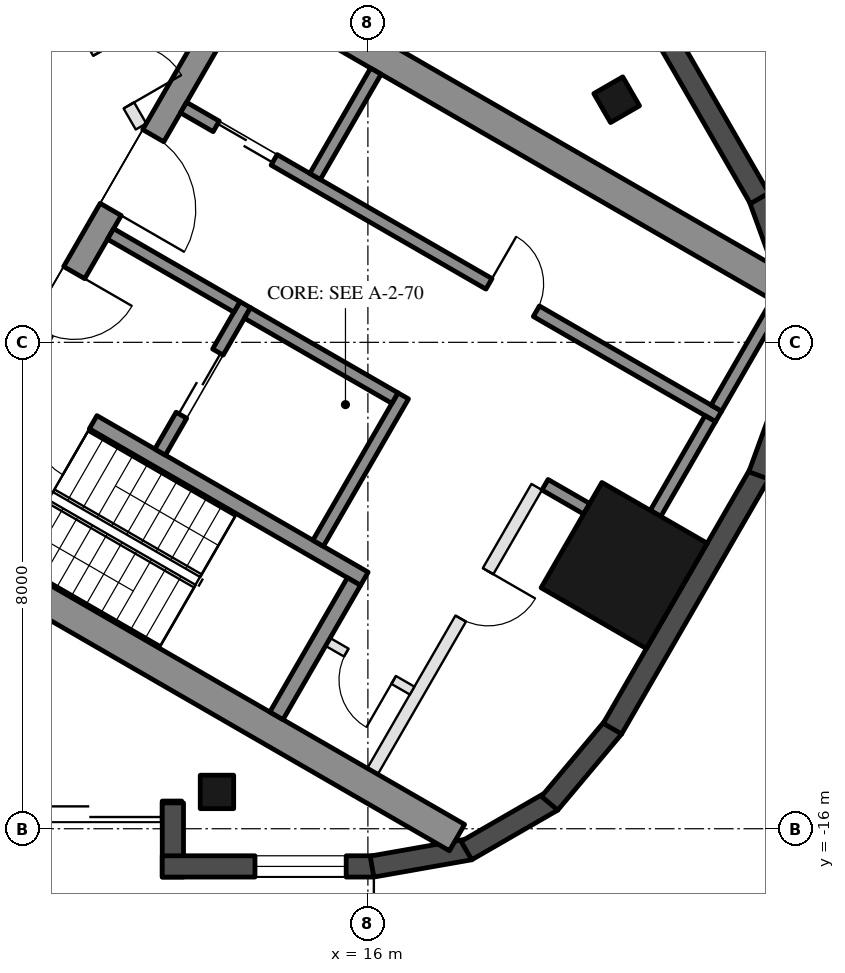
"""IFC4 building model, lengths in metres.
Left out: names, types, materials, properties, quantities, classifications, styles, units other than length and angle.
Written with IfcOpenShell. Run it as: python <this file> out.ifc"""

import sys

from ifc_helpers import new_model, si_unit, direction, frame, frame_2d, origin, origin_2d, place, context, subcontext, project, spatial, rectangle, hollow_rectangle, extrude, boolean, halfspace, element, fill, save


model = new_model("IFC4")
c1 = context("Model", 3, precision=1e-05, world=origin(), true_north=direction((0.0, 1.0)))
c2 = subcontext(c1, "Body", "Model", "MODEL_VIEW")
j1 = project(units=[si_unit("LENGTHUNIT", "METRE"), si_unit("PLANEANGLEUNIT", "RADIAN")], contexts=[c1])
p1 = place(None, origin())
s1 = spatial("IfcSite", under=j1, at=p1, CompositionType="ELEMENT")
p2 = place(p1, origin())
s2 = spatial("IfcBuilding", under=s1, at=p2, CompositionType="ELEMENT")
p3 = place(p2, frame((0.0, 0.0, 302.2)))
s3 = spatial("IfcBuildingStorey", under=s2, at=p3, CompositionType="ELEMENT", Elevation=302.2)
for number, where, z_axis, x_axis in (
    (1, (13.518, -15.395, 0.0), (0.0, 0.0, 1.0), (-1.0, 0.0, 0.0)),
    (2, (20.091, -4.01, 0.0), (0.0, 0.0, 1.0), (-0.5, 0.866, 0.0)),
):
    element("IfcColumn", number, at=place(p3, frame(where, z_axis=z_axis, x_axis=x_axis)), inside=s3, PredefinedType="COLUMN", context=c2, shape_type="SweptSolid", body=[
        boolean("DIFFERENCE", extrude(hollow_rectangle(XDim=0.55, YDim=0.55, WallThickness=0.025, at=origin_2d()), origin(), (0.0, 0.0, 1.0), 3.7), halfspace(frame((0.0, 0.0, 0.04), z_axis=(0.0, 0.0, 1.0), x_axis=(1.0, 0.0, 0.0)), True)),
    ])
p4 = place(p3, frame((20.214, -11.671, 0.0), z_axis=(0.0, 0.0, 1.0), x_axis=(0.5, 0.866025403784, 0.0)))
e3 = element("IfcColumn", 3, at=p4, inside=s3, PredefinedType="COLUMN", context=c2, shape_type="SweptSolid", body=[
    boolean("DIFFERENCE", extrude(hollow_rectangle(XDim=2.0, YDim=2.0, WallThickness=0.05, at=origin_2d()), origin(), (0.0, 0.0, 1.0), 3.7), halfspace(frame((0.0, 0.0, 0.113), z_axis=(0.0, 0.0, 1.0), x_axis=(1.0, 0.0, 0.0)), True)),
])
p5 = place(p3, frame((7.339, -15.719, 0.0), z_axis=(0.0, 0.0, 1.0), x_axis=(1.0, 0.0, 0.0)))
e4 = element("IfcWall", 4, at=p5, inside=s3, PredefinedType="SOLIDWALL", context=c2, shape_type="SweptSolid", body=[
    extrude(rectangle(XDim=5.599, YDim=0.35, at=frame_2d((2.799, 0.0))), origin(), (0.0, 0.0, 1.0), 3.55),
])
p6 = place(p5, frame((2.879, 0.0, 0.0)))
e5 = element("IfcOpeningElement", 5, at=p6, cuts=e4, PredefinedType="OPENING", context=c2, shape_type="SweptSolid", body=[
    extrude(rectangle(XDim=2.4, YDim=2.4, at=frame_2d((1.2, 1.2))), frame((0.0, 0.185, 0.0), z_axis=(0.0, -1.0, 0.0), x_axis=(1.0, 0.0, 0.0)), (0.0, 0.0, 1.0), 0.37),
])
p7 = place(p5, frame((0.831, 0.0, 0.3)))
e6 = element("IfcOpeningElement", 6, at=p7, cuts=e4, PredefinedType="OPENING", context=c2, shape_type="SweptSolid", body=[
    extrude(rectangle(XDim=1.7, YDim=2.65, at=frame_2d((0.85, 1.325))), frame((0.0, 0.185, 0.0), z_axis=(0.0, -1.0, 0.0), x_axis=(1.0, 0.0, 0.0)), (0.0, 0.0, 1.0), 0.37),
])
p8 = place(p3, frame((12.793, -15.575, 0.0), z_axis=(0.0, 0.0, 1.0), x_axis=(0.0, -1.0, 0.0)))
e7 = element("IfcWall", 7, at=p8, inside=s3, PredefinedType="SOLIDWALL", context=c2, shape_type="SweptSolid", body=[
    extrude(rectangle(XDim=1.22, YDim=0.35, at=frame_2d((0.61, 0.0))), origin(), (0.0, 0.0, 1.0), 3.55),
])
p9 = place(p3, frame((12.618, -16.62, 0.0), z_axis=(0.0, 0.0, 1.0), x_axis=(1.0, 0.0, 0.0)))
e8 = element("IfcWall", 8, at=p9, inside=s3, PredefinedType="SOLIDWALL", context=c2, shape_type="SweptSolid", body=[
    extrude(rectangle(XDim=3.48, YDim=0.35, at=frame_2d((1.74, 0.0))), origin(), (0.0, 0.0, 1.0), 3.55),
])
p10 = place(p9, frame((1.525, 0.0, 0.3)))
e9 = element("IfcOpeningElement", 9, at=p10, cuts=e8, PredefinedType="OPENING", context=c2, shape_type="SweptSolid", body=[
    extrude(rectangle(XDim=1.5, YDim=2.65, at=frame_2d((0.75, 1.325))), frame((0.0, 0.185, 0.0), z_axis=(0.0, -1.0, 0.0), x_axis=(1.0, 0.0, 0.0)), (0.0, 0.0, 1.0), 0.37),
])
p11 = place(p3, frame((16.068, -16.622, 0.0), z_axis=(0.0, 0.0, 1.0), x_axis=(0.98479107762, 0.173742721977, 0.0)))
e10 = element("IfcWall", 10, at=p11, inside=s3, PredefinedType="SOLIDWALL", context=c2, shape_type="SweptSolid", body=[
    extrude(rectangle(XDim=1.634, YDim=0.35, at=frame_2d((0.817, 0.0))), origin(), (0.0, 0.0, 1.0), 3.55),
])
p12 = place(p3, frame((17.62, -16.359, 0.0), z_axis=(0.0, 0.0, 1.0), x_axis=(0.866083589932, 0.499899205091, 0.0)))
e11 = element("IfcWall", 11, at=p12, inside=s3, PredefinedType="SOLIDWALL", context=c2, shape_type="SweptSolid", body=[
    extrude(rectangle(XDim=1.634, YDim=0.35, at=frame_2d((0.817, 0.0))), origin(), (0.0, 0.0, 1.0), 3.55),
])
p13 = place(p3, frame((18.989, -15.581, 0.0), z_axis=(0.0, 0.0, 1.0), x_axis=(0.642708448155, 0.766110860562, 0.0)))
e12 = element("IfcWall", 12, at=p13, inside=s3, PredefinedType="SOLIDWALL", context=c2, shape_type="SweptSolid", body=[
    extrude(rectangle(XDim=1.634, YDim=0.35, at=frame_2d((0.817, 0.0))), origin(), (0.0, 0.0, 1.0), 3.55),
])
p14 = place(p3, frame((20.021, -14.354, 0.0), z_axis=(0.0, 0.0, 1.0), x_axis=(0.500012048649, 0.866018447382, 0.0)))
e13 = element("IfcWall", 13, at=p14, inside=s3, PredefinedType="SOLIDWALL", context=c2, shape_type="SweptSolid", body=[
    extrude(rectangle(XDim=4.841, YDim=0.35, at=frame_2d((2.42, 0.0))), origin(), (0.0, 0.0, 1.0), 3.55),
])
for number, where, z_axis, x_axis in (
    (14, (22.429, -10.19, 0.0), (0.0, 0.0, 1.0), (0.342, 0.94, 0.0)),
    (15, (22.988, -7.14, 0.0), (0.0, 0.0, 1.0), (-0.342, 0.94, 0.0)),
):
    element("IfcWall", number, at=place(p3, frame(where, z_axis=z_axis, x_axis=x_axis)), inside=s3, PredefinedType="SOLIDWALL", context=c2, shape_type="SweptSolid", body=[
        extrude(rectangle(XDim=1.634, YDim=0.35, at=frame_2d((0.817, 0.0))), origin(), (0.0, 0.0, 1.0), 3.55),
    ])
p15 = place(p3, frame((22.442, -5.632, 0.0), z_axis=(0.0, 0.0, 1.0), x_axis=(-0.499983205548, 0.866035099848, 0.0)))
e16 = element("IfcWall", 16, at=p15, inside=s3, PredefinedType="SOLIDWALL", context=c2, shape_type="SweptSolid", body=[
    extrude(rectangle(XDim=10.239, YDim=0.35, at=frame_2d((5.12, 0.0))), origin(), (0.0, 0.0, 1.0), 3.55),
])
p16 = place(p15, frame((5.32, 0.0, 0.0)))
e17 = element("IfcOpeningElement", 17, at=p16, cuts=e16, PredefinedType="OPENING", context=c2, shape_type="SweptSolid", body=[
    extrude(rectangle(XDim=2.4, YDim=2.4, at=frame_2d((1.2, 1.2))), frame((0.0, 0.185, 0.0), z_axis=(0.0, -1.0, 0.0), x_axis=(1.0, 0.0, 0.0)), (0.0, 0.0, 1.0), 0.37),
])
p17 = place(p15, frame((3.205, 0.0, 0.3)))
e18 = element("IfcOpeningElement", 18, at=p17, cuts=e16, PredefinedType="OPENING", context=c2, shape_type="SweptSolid", body=[
    extrude(rectangle(XDim=1.8, YDim=2.65, at=frame_2d((0.9, 1.325))), frame((0.0, 0.185, 0.0), z_axis=(0.0, -1.0, 0.0), x_axis=(1.0, 0.0, 0.0)), (0.0, 0.0, 1.0), 0.37),
])
for number, where, z_axis, x_axis in (
    (19, (8.547, -10.997, 0.0), (0.0, 0.0, 1.0), (0.866, -0.5, 0.0)),
    (20, (13.797, -1.903, 0.0), (0.0, 0.0, 1.0), (0.866, -0.5, 0.0)),
):
    element("IfcWall", number, at=place(p3, frame(where, z_axis=z_axis, x_axis=x_axis)), inside=s3, PredefinedType="SHEAR", context=c2, shape_type="SweptSolid", body=[
        extrude(rectangle(XDim=10.298, YDim=0.5, at=frame_2d((5.149, 0.0))), origin(), (0.0, 0.0, 1.0), 3.5),
    ])
p18 = place(p3, frame((8.845, -10.88, 0.0), z_axis=(0.0, 0.0, 1.0), x_axis=(0.500004234368, 0.866022959057, 0.0)))
e21 = element("IfcWall", 21, at=p18, inside=s3, PredefinedType="SHEAR", context=c2, shape_type="SweptSolid", body=[
    extrude(rectangle(XDim=10.0, YDim=0.4, at=frame_2d((5.0, 0.0))), origin(), (0.0, 0.0, 1.0), 3.5),
])
p19 = place(p18, frame((3.55, 0.0, 0.0)))
e22 = element("IfcOpeningElement", 22, at=p19, cuts=e21, PredefinedType="OPENING", context=c2, shape_type="SweptSolid", body=[
    extrude(rectangle(XDim=1.1, YDim=2.1, at=frame_2d((0.55, 1.05))), frame((0.0, 0.21, 0.0), z_axis=(0.0, -1.0, 0.0), x_axis=(1.0, 0.0, 0.0)), (0.0, 0.0, 1.0), 0.42),
])
p20 = place(p18, frame((5.85, 0.0, 0.0)))
e23 = element("IfcOpeningElement", 23, at=p20, cuts=e21, PredefinedType="OPENING", context=c2, shape_type="SweptSolid", body=[
    extrude(rectangle(XDim=1.4, YDim=2.1, at=frame_2d((0.7, 1.05))), frame((0.0, 0.21, 0.0), z_axis=(0.0, -1.0, 0.0), x_axis=(1.0, 0.0, 0.0)), (0.0, 0.0, 1.0), 0.42),
])
p21 = place(p3, frame((10.356, -8.664, 0.0), z_axis=(0.0, 0.0, 1.0), x_axis=(0.866028629588, -0.499994412703, 0.0)))
e24 = element("IfcWall", 24, at=p21, inside=s3, PredefinedType="SHEAR", context=c2, shape_type="SweptSolid", body=[
    extrude(rectangle(XDim=6.45, YDim=0.25, at=frame_2d((3.225, 0.0))), origin(), (0.0, 0.0, 1.0), 3.5),
])
p22 = place(p21, frame((0.3, 0.0, 0.0)))
e25 = element("IfcOpeningElement", 25, at=p22, cuts=e24, PredefinedType="OPENING", context=c2, shape_type="SweptSolid", body=[
    extrude(rectangle(XDim=1.0, YDim=2.1, at=frame_2d((0.5, 1.05))), frame((0.0, 0.135, 0.0), z_axis=(0.0, -1.0, 0.0), x_axis=(1.0, 0.0, 0.0)), (0.0, 0.0, 1.0), 0.27),
])
p23 = place(p3, frame((14.496, -14.143, 0.0), z_axis=(0.0, 0.0, 1.0), x_axis=(0.500062241894, 0.865989465428, 0.0)))
e26 = element("IfcWall", 26, at=p23, inside=s3, PredefinedType="SHEAR", context=c2, shape_type="SweptSolid", body=[
    extrude(rectangle(XDim=2.55, YDim=0.25, at=frame_2d((1.275, 0.0))), origin(), (0.0, 0.0, 1.0), 3.5),
])
p24 = place(p3, frame((15.181, -11.305, 0.0), z_axis=(0.0, 0.0, 1.0), x_axis=(0.49994636267, 0.866056369097, 0.0)))
e27 = element("IfcWall", 27, at=p24, inside=s3, PredefinedType="SHEAR", context=c2, shape_type="SweptSolid", body=[
    extrude(rectangle(XDim=2.8, YDim=0.2, at=frame_2d((1.4, 0.0))), origin(), (0.0, 0.0, 1.0), 3.5),
])
p25 = place(p3, frame((12.583, -9.805, 0.0), z_axis=(0.0, 0.0, 1.0), x_axis=(0.49994636267, 0.866056369097, 0.0)))
e28 = element("IfcWall", 28, at=p25, inside=s3, PredefinedType="SHEAR", context=c2, shape_type="SweptSolid", body=[
    extrude(rectangle(XDim=2.8, YDim=0.2, at=frame_2d((1.4, 0.0))), origin(), (0.0, 0.0, 1.0), 3.5),
])
p26 = place(p25, frame((0.7, 0.0, 0.0)))
e29 = element("IfcOpeningElement", 29, at=p26, cuts=e28, PredefinedType="OPENING", context=c2, shape_type="SweptSolid", body=[
    extrude(rectangle(XDim=1.2, YDim=2.1, at=frame_2d((0.6, 1.05))), frame((0.0, 0.11, 0.0), z_axis=(0.0, -1.0, 0.0), x_axis=(1.0, 0.0, 0.0)), (0.0, 0.0, 1.0), 0.22),
])
p27 = place(p3, frame((11.768, -6.217, 0.0), z_axis=(0.0, 0.0, 1.0), x_axis=(0.866050077142, -0.499957262057, 0.0)))
e30 = element("IfcWall", 30, at=p27, inside=s3, PredefinedType="SHEAR", context=c2, shape_type="SweptSolid", body=[
    extrude(rectangle(XDim=2.4, YDim=0.2, at=frame_2d((1.2, 0.0))), origin(), (0.0, 0.0, 1.0), 3.5),
])
p28 = place(p3, frame((14.02, -7.517, 0.0), z_axis=(0.0, 0.0, 1.0), x_axis=(0.866034573852, -0.49998411664, 0.0)))
e31 = element("IfcWall", 31, at=p28, inside=s3, PredefinedType="SHEAR", context=c2, shape_type="SweptSolid", body=[
    extrude(rectangle(XDim=2.8, YDim=0.2, at=frame_2d((1.4, 0.0))), origin(), (0.0, 0.0, 1.0), 3.5),
])
p29 = place(p3, frame((12.968, -4.138, 0.0), z_axis=(0.0, 0.0, 1.0), x_axis=(0.866028328073, -0.49999493495, 0.0)))
e32 = element("IfcWall", 32, at=p29, inside=s3, PredefinedType="SHEAR", context=c2, shape_type="SweptSolid", body=[
    extrude(rectangle(XDim=10.16, YDim=0.2, at=frame_2d((5.08, 0.0))), origin(), (0.0, 0.0, 1.0), 3.5),
])
p30 = place(p29, frame((0.62, 0.0, 0.0)))
e33 = element("IfcOpeningElement", 33, at=p30, cuts=e32, PredefinedType="OPENING", context=c2, shape_type="SweptSolid", body=[
    extrude(rectangle(XDim=1.1, YDim=2.1, at=frame_2d((0.55, 1.05))), frame((0.0, 0.11, 0.0), z_axis=(0.0, -1.0, 0.0), x_axis=(1.0, 0.0, 0.0)), (0.0, 0.0, 1.0), 0.22),
])
p31 = place(p29, frame((5.8, 0.0, 0.0)))
e34 = element("IfcOpeningElement", 34, at=p31, cuts=e32, PredefinedType="OPENING", context=c2, shape_type="SweptSolid", body=[
    extrude(rectangle(XDim=0.9, YDim=2.1, at=frame_2d((0.45, 1.05))), frame((0.0, 0.11, 0.0), z_axis=(0.0, -1.0, 0.0), x_axis=(1.0, 0.0, 0.0)), (0.0, 0.0, 1.0), 0.22),
])
p32 = place(p3, frame((20.73, -10.814, 0.0), z_axis=(0.0, 0.0, 1.0), x_axis=(0.499961193289, 0.866047807691, 0.0)))
e35 = element("IfcWall", 35, at=p32, inside=s3, PredefinedType="SHEAR", context=c2, shape_type="SweptSolid", body=[
    extrude(rectangle(XDim=1.8, YDim=0.2, at=frame_2d((0.9, 0.0))), origin(), (0.0, 0.0, 1.0), 3.5),
])
p33 = place(p3, frame((18.913, -10.342, 0.0), z_axis=(0.0, 0.0, 1.0), x_axis=(0.86597493103, -0.500087411186, 0.0)))
e36 = element("IfcWall", 36, at=p33, inside=s3, PredefinedType="SHEAR", context=c2, shape_type="SweptSolid", body=[
    extrude(rectangle(XDim=0.791, YDim=0.2, at=frame_2d((0.396, 0.0))), origin(), (0.0, 0.0, 1.0), 3.5),
])
for number, where, z_axis, x_axis in (
    (37, (15.131, -5.272, 0.0), (0.0, 0.0, 1.0), (0.5, 0.866, 0.0)),
    (38, (21.73, -9.082, 0.0), (0.0, 0.0, 1.0), (0.5, 0.866, 0.0)),
):
    element("IfcWall", number, at=place(p3, frame(where, z_axis=z_axis, x_axis=x_axis)), inside=s3, PredefinedType="SHEAR", context=c2, shape_type="SweptSolid", body=[
        extrude(rectangle(XDim=2.0, YDim=0.2, at=frame_2d((1.0, 0.0))), origin(), (0.0, 0.0, 1.0), 3.5),
    ])
p34 = place(p3, frame((16.076, -15.055, 0.0), z_axis=(0.0, 0.0, 1.0), x_axis=(0.499995103361, 0.866028230842, 0.0)))
e39 = element("IfcWall", 39, at=p34, inside=s3, PredefinedType="PARTITIONING", context=c2, shape_type="SweptSolid", body=[
    extrude(rectangle(XDim=5.4, YDim=0.2, at=frame_2d((2.7, 0.0))), origin(), (0.0, 0.0, 1.0), 3.5),
])
p35 = place(p34, frame((2.9, 0.0, 0.0)))
e40 = element("IfcOpeningElement", 40, at=p35, cuts=e39, PredefinedType="OPENING", context=c2, shape_type="SweptSolid", body=[
    extrude(rectangle(XDim=0.9, YDim=2.1, at=frame_2d((0.45, 1.05))), frame((0.0, 0.11, 0.0), z_axis=(0.0, -1.0, 0.0), x_axis=(1.0, 0.0, 0.0)), (0.0, 0.0, 1.0), 0.22),
])
p36 = place(p3, frame((15.342, -12.928, 0.0), z_axis=(0.0, 0.0, 1.0), x_axis=(0.865989903783, -0.500061482766, 0.0)))
e41 = element("IfcWall", 41, at=p36, inside=s3, PredefinedType="PARTITIONING", context=c2, shape_type="SweptSolid", body=[
    extrude(rectangle(XDim=1.6, YDim=0.15, at=frame_2d((0.8, 0.0))), origin(), (0.0, 0.0, 1.0), 3.5),
])
p37 = place(p36, frame((0.35, 0.0, 0.0)))
e42 = element("IfcOpeningElement", 42, at=p37, cuts=e41, PredefinedType="OPENING", context=c2, shape_type="SweptSolid", body=[
    extrude(rectangle(XDim=0.9, YDim=2.1, at=frame_2d((0.45, 1.05))), frame((0.0, 0.085, 0.0), z_axis=(0.0, -1.0, 0.0), x_axis=(1.0, 0.0, 0.0)), (0.0, 0.0, 1.0), 0.17),
])
p38 = place(p3, frame((10.365, -1.152, 0.0), z_axis=(0.0, 0.0, 1.0), x_axis=(0.499999897272, -0.866025463095, 0.0)))
e43 = element("IfcWall", 43, at=p38, inside=s3, PredefinedType="PARTITIONING", context=c2, shape_type="SweptSolid", body=[
    extrude(rectangle(XDim=3.809, YDim=0.2, at=frame_2d((1.904, 0.0))), origin(), (0.0, 0.0, 1.0), 3.1),
])
p39 = place(p38, frame((2.409, 0.0, 0.0)))
e44 = element("IfcOpeningElement", 44, at=p39, cuts=e43, PredefinedType="OPENING", context=c2, shape_type="SweptSolid", body=[
    extrude(rectangle(XDim=1.0, YDim=2.1, at=frame_2d((0.5, 1.05))), frame((0.0, 0.11, 0.0), z_axis=(0.0, -1.0, 0.0), x_axis=(1.0, 0.0, 0.0)), (0.0, 0.0, 1.0), 0.22),
])
p40 = place(p6, frame((2.4, 0.0, 0.0), z_axis=(0.0, 0.0, 1.0), x_axis=(-1.0, 0.0, 0.0)))
e45 = element("IfcDoor", 45, at=p40, inside=s3, OperationType="SLIDING_TO_LEFT", PredefinedType="DOOR", context=c2, shape_type="SweptSolid", body=[
    extrude(rectangle(XDim=2.4, YDim=2.4, at=frame_2d((1.2, 1.2))), frame((0.0, 0.025, 0.0), z_axis=(0.0, -1.0, 0.0), x_axis=(1.0, 0.0, 0.0)), (0.0, 0.0, 1.0), 0.05),
])
fill(e5, e45)
p41 = place(p10, origin())
e46 = element("IfcWindow", 46, at=p41, inside=s3, PartitioningType="SINGLE_PANEL", PredefinedType="WINDOW", context=c2, shape_type="SweptSolid", body=[
    extrude(rectangle(XDim=1.5, YDim=2.65, at=frame_2d((0.75, 1.325))), frame((0.0, 0.03, 0.0), z_axis=(0.0, -1.0, 0.0), x_axis=(1.0, 0.0, 0.0)), (0.0, 0.0, 1.0), 0.06),
])
fill(e9, e46)
p42 = place(p26, origin())
e47 = element("IfcDoor", 47, at=p42, inside=s3, OperationType="DOUBLE_DOOR_SLIDING", PredefinedType="DOOR", context=c2, shape_type="SweptSolid", body=[
    extrude(rectangle(XDim=1.2, YDim=2.1, at=frame_2d((0.6, 1.05))), frame((0.0, 0.025, 0.0), z_axis=(0.0, -1.0, 0.0), x_axis=(1.0, 0.0, 0.0)), (0.0, 0.0, 1.0), 0.05),
])
fill(e29, e47)
p43 = place(p37, frame((0.9, 0.0, 0.0), z_axis=(0.0, 0.0, 1.0), x_axis=(-1.0, 0.0, 0.0)))
e48 = element("IfcDoor", 48, at=p43, inside=s3, OperationType="SINGLE_SWING_LEFT", PredefinedType="DOOR", context=c2, shape_type="SweptSolid", body=[
    extrude(rectangle(XDim=0.9, YDim=2.1, at=frame_2d((0.45, 1.05))), frame((0.0, 0.025, 0.0), z_axis=(0.0, -1.0, 0.0), x_axis=(1.0, 0.0, 0.0)), (0.0, 0.0, 1.0), 0.05),
])
fill(e42, e48)
p44 = place(p30, origin())
e49 = element("IfcDoor", 49, at=p44, inside=s3, OperationType="DOUBLE_DOOR_SLIDING", PredefinedType="DOOR", context=c2, shape_type="SweptSolid", body=[
    extrude(rectangle(XDim=1.1, YDim=2.1, at=frame_2d((0.55, 1.05))), frame((0.0, 0.025, 0.0), z_axis=(0.0, -1.0, 0.0), x_axis=(1.0, 0.0, 0.0)), (0.0, 0.0, 1.0), 0.05),
])
fill(e33, e49)
p45 = place(p31, origin())
e50 = element("IfcDoor", 50, at=p45, inside=s3, OperationType="SINGLE_SWING_LEFT", PredefinedType="DOOR", context=c2, shape_type="SweptSolid", body=[
    extrude(rectangle(XDim=0.9, YDim=2.1, at=frame_2d((0.45, 1.05))), frame((0.0, 0.025, 0.0), z_axis=(0.0, -1.0, 0.0), x_axis=(1.0, 0.0, 0.0)), (0.0, 0.0, 1.0), 0.05),
])
fill(e34, e50)
p46 = place(p35, frame((0.9, 0.0, 0.0), z_axis=(0.0, 0.0, 1.0), x_axis=(-1.0, 0.0, 0.0)))
e51 = element("IfcDoor", 51, at=p46, inside=s3, OperationType="SINGLE_SWING_LEFT", PredefinedType="DOOR", context=c2, shape_type="SweptSolid", body=[
    extrude(rectangle(XDim=0.9, YDim=2.1, at=frame_2d((0.45, 1.05))), frame((0.0, 0.025, 0.0), z_axis=(0.0, -1.0, 0.0), x_axis=(1.0, 0.0, 0.0)), (0.0, 0.0, 1.0), 0.05),
])
fill(e40, e51)
p47 = place(p19, frame((1.1, 0.0, 0.0), z_axis=(0.0, 0.0, 1.0), x_axis=(-1.0, 0.0, 0.0)))
e52 = element("IfcDoor", 52, at=p47, inside=s3, OperationType="SINGLE_SWING_LEFT", PredefinedType="DOOR", context=c2, shape_type="SweptSolid", body=[
    extrude(rectangle(XDim=1.1, YDim=2.1, at=frame_2d((0.55, 1.05))), frame((0.0, 0.025, 0.0), z_axis=(0.0, -1.0, 0.0), x_axis=(1.0, 0.0, 0.0)), (0.0, 0.0, 1.0), 0.05),
])
fill(e22, e52)
p48 = place(p20, frame((1.4, 0.0, 0.0), z_axis=(0.0, 0.0, 1.0), x_axis=(-1.0, 0.0, 0.0)))
e53 = element("IfcDoor", 53, at=p48, inside=s3, OperationType="DOUBLE_DOOR_SINGLE_SWING", PredefinedType="DOOR", context=c2, shape_type="SweptSolid", body=[
    extrude(rectangle(XDim=1.4, YDim=2.1, at=frame_2d((0.7, 1.05))), frame((0.0, 0.025, 0.0), z_axis=(0.0, -1.0, 0.0), x_axis=(1.0, 0.0, 0.0)), (0.0, 0.0, 1.0), 0.05),
])
fill(e23, e53)
p49 = place(p22, frame((1.0, 0.0, 0.0), z_axis=(0.0, 0.0, 1.0), x_axis=(-1.0, 0.0, 0.0)))
e54 = element("IfcDoor", 54, at=p49, inside=s3, OperationType="SINGLE_SWING_LEFT", PredefinedType="DOOR", context=c2, shape_type="SweptSolid", body=[
    extrude(rectangle(XDim=1.0, YDim=2.1, at=frame_2d((0.5, 1.05))), frame((0.0, 0.025, 0.0), z_axis=(0.0, -1.0, 0.0), x_axis=(1.0, 0.0, 0.0)), (0.0, 0.0, 1.0), 0.05),
])
fill(e25, e54)
p50 = place(p39, origin())
e55 = element("IfcDoor", 55, at=p50, inside=s3, OperationType="SINGLE_SWING_RIGHT", PredefinedType="DOOR", context=c2, shape_type="SweptSolid", body=[
    extrude(rectangle(XDim=1.0, YDim=2.1, at=frame_2d((0.5, 1.05))), frame((0.0, 0.025, 0.0), z_axis=(0.0, -1.0, 0.0), x_axis=(1.0, 0.0, 0.0)), (0.0, 0.0, 1.0), 0.05),
])
fill(e44, e55)
save(model, sys.argv[1])
